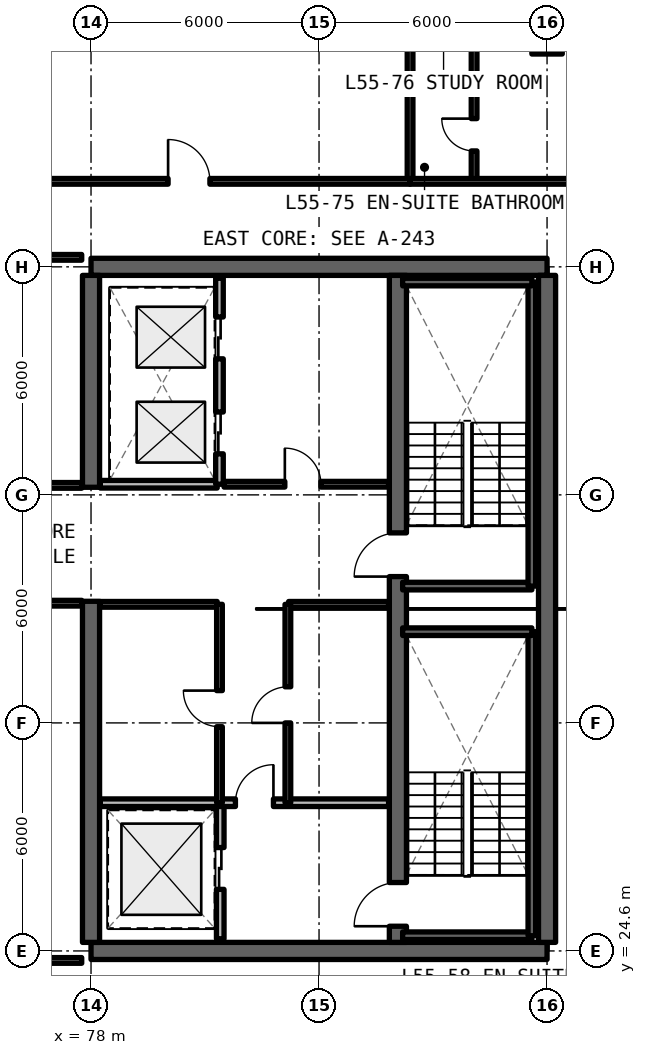
"""IFC4 building model, lengths in metres.
Left out: names, types, materials, properties, quantities, classifications, styles, units other than length and angle.
Written with IfcOpenShell. Run it as: python <this file> out.ifc"""

import sys

from ifc_helpers import new_model, si_unit, direction, frame, frame_2d, origin, origin_2d, place, context, subcontext, project, spatial, rectangle, extrude, element, fill, save


model = new_model("IFC4")
c1 = context("Model", 3, precision=1e-05, world=origin(), true_north=direction((0.0, 1.0)))
c2 = subcontext(c1, "Body", "Model", "MODEL_VIEW")
j1 = project(units=[si_unit("LENGTHUNIT", "METRE"), si_unit("PLANEANGLEUNIT", "RADIAN")], contexts=[c1])
p1 = place(None, origin())
s1 = spatial("IfcSite", under=j1, at=p1, CompositionType="ELEMENT")
p2 = place(p1, origin())
s2 = spatial("IfcBuilding", under=s1, at=p2, CompositionType="ELEMENT")
p3 = place(p2, frame((0.0, 0.0, 198.33)))
s3 = spatial("IfcBuildingStorey", under=s2, at=p3, CompositionType="ELEMENT", Elevation=198.33)
for number, where, z_axis, x_axis in (
    (1, (78.0, 24.6, 0.0), (0.0, 0.0, 1.0), (1.0, 0.0, 0.0)),
    (2, (90.0, 42.6, 0.0), (0.0, 0.0, 1.0), (-1.0, 0.0, 0.0)),
):
    element("IfcWall", number, at=place(p3, frame(where, z_axis=z_axis, x_axis=x_axis)), inside=s3, PredefinedType="SHEAR", context=c2, shape_type="SweptSolid", body=[
        extrude(rectangle(XDim=12.0, YDim=0.45, at=frame_2d((6.0, 0.0))), origin(), (0.0, 0.0, 1.0), 3.3),
    ])
p4 = place(p3, frame((90.0, 24.825, 0.0), z_axis=(0.0, 0.0, 1.0), x_axis=(0.0, 1.0, 0.0)))
e3 = element("IfcWall", 3, at=p4, inside=s3, PredefinedType="SHEAR", context=c2, shape_type="SweptSolid", body=[
    extrude(rectangle(XDim=17.55, YDim=0.45, at=frame_2d((8.775, 0.0))), origin(), (0.0, 0.0, 1.0), 3.3),
])
p5 = place(p3, frame((78.0, 24.825, 0.0), z_axis=(0.0, 0.0, 1.0), x_axis=(0.0, 1.0, 0.0)))
e4 = element("IfcWall", 4, at=p5, inside=s3, PredefinedType="SHEAR", context=c2, shape_type="SweptSolid", body=[
    extrude(rectangle(XDim=8.975, YDim=0.45, at=frame_2d((4.488, 0.0))), origin(), (0.0, 0.0, 1.0), 3.3),
])
p6 = place(p3, frame((78.0, 36.8, 0.0), z_axis=(0.0, 0.0, 1.0), x_axis=(0.0, 1.0, 0.0)))
e5 = element("IfcWall", 5, at=p6, inside=s3, PredefinedType="SHEAR", context=c2, shape_type="SweptSolid", body=[
    extrude(rectangle(XDim=5.575, YDim=0.45, at=frame_2d((2.788, 0.0))), origin(), (0.0, 0.0, 1.0), 3.3),
])
p7 = place(p3, frame((86.075, 24.825, 0.0), z_axis=(0.0, 0.0, 1.0), x_axis=(0.0, 1.0, 0.0)))
e6 = element("IfcWall", 6, at=p7, inside=s3, PredefinedType="SHEAR", context=c2, shape_type="SweptSolid", body=[
    extrude(rectangle(XDim=17.55, YDim=0.45, at=frame_2d((8.775, 0.0))), origin(), (0.0, 0.0, 1.0), 3.3),
])
p8 = place(p7, frame((0.425, 0.0, 0.0)))
e7 = element("IfcOpeningElement", 7, at=p8, cuts=e6, PredefinedType="OPENING", context=c2, shape_type="SweptSolid", body=[
    extrude(rectangle(XDim=1.15, YDim=2.15, at=frame_2d((0.575, 1.075))), frame((0.0, 0.235, 0.0), z_axis=(0.0, -1.0, 0.0), x_axis=(1.0, 0.0, 0.0)), (0.0, 0.0, 1.0), 0.47),
])
p9 = place(p7, frame((9.625, 0.0, 0.0)))
e8 = element("IfcOpeningElement", 8, at=p9, cuts=e6, PredefinedType="OPENING", context=c2, shape_type="SweptSolid", body=[
    extrude(rectangle(XDim=1.15, YDim=2.15, at=frame_2d((0.575, 1.075))), frame((0.0, 0.235, 0.0), z_axis=(0.0, -1.0, 0.0), x_axis=(1.0, 0.0, 0.0)), (0.0, 0.0, 1.0), 0.47),
])
p10 = place(p3, frame((90.0, 48.6, 0.0), z_axis=(0.0, 0.0, 1.0), x_axis=(1.0, 0.0, 0.0)))
e9 = element("IfcColumn", 9, at=p10, inside=s3, PredefinedType="COLUMN", context=c2, shape_type="SweptSolid", body=[
    extrude(rectangle(XDim=0.8, YDim=0.8, at=origin_2d()), origin(), (0.0, 0.0, 1.0), 3.3),
])
p11 = place(p3, frame((81.4, 24.92, 0.0), z_axis=(0.0, 0.0, 1.0), x_axis=(0.0, 1.0, 0.0)))
e10 = element("IfcWall", 10, at=p11, inside=s3, PredefinedType="SOLIDWALL", context=c2, shape_type="SweptSolid", body=[
    extrude(rectangle(XDim=3.58, YDim=0.2, at=frame_2d((1.79, 0.0))), origin(), (0.0, 0.0, 1.0), 2.35),
])
p12 = place(p11, frame((1.3, 0.0, 0.0)))
e11 = element("IfcOpeningElement", 11, at=p12, cuts=e10, PredefinedType="OPENING", context=c2, shape_type="SweptSolid", body=[
    extrude(rectangle(XDim=1.1, YDim=2.2, at=frame_2d((0.55, 1.1))), frame((0.0, 0.11, 0.0), z_axis=(0.0, -1.0, 0.0), x_axis=(1.0, 0.0, 0.0)), (0.0, 0.0, 1.0), 0.22),
])
p13 = place(p3, frame((78.245, 28.5, 0.0), z_axis=(0.0, 0.0, 1.0), x_axis=(1.0, 0.0, 0.0)))
e12 = element("IfcWall", 12, at=p13, inside=s3, PredefinedType="SOLIDWALL", context=c2, shape_type="SweptSolid", body=[
    extrude(rectangle(XDim=7.585, YDim=0.2, at=frame_2d((3.792, 0.0))), origin(), (0.0, 0.0, 1.0), 2.35),
])
p14 = place(p13, frame((3.555, 0.0, 0.0)))
e13 = element("IfcOpeningElement", 13, at=p14, cuts=e12, PredefinedType="OPENING", context=c2, shape_type="SweptSolid", body=[
    extrude(rectangle(XDim=1.0, YDim=2.15, at=frame_2d((0.5, 1.075))), frame((0.0, 0.11, 0.0), z_axis=(0.0, -1.0, 0.0), x_axis=(1.0, 0.0, 0.0)), (0.0, 0.0, 1.0), 0.22),
])
p15 = place(p3, frame((83.2, 33.72, 0.0), z_axis=(0.0, 0.0, 1.0), x_axis=(1.0, 0.0, 0.0)))
e14 = element("IfcWall", 14, at=p15, inside=s3, PredefinedType="SOLIDWALL", context=c2, shape_type="SweptSolid", body=[
    extrude(rectangle(XDim=2.63, YDim=0.15, at=frame_2d((1.315, 0.0))), origin(), (0.0, 0.0, 1.0), 2.35),
])
p16 = place(p3, frame((83.18, 28.5, 0.0), z_axis=(0.0, 0.0, 1.0), x_axis=(0.0, 1.0, 0.0)))
e15 = element("IfcWall", 15, at=p16, inside=s3, PredefinedType="SOLIDWALL", context=c2, shape_type="SweptSolid", body=[
    extrude(rectangle(XDim=5.22, YDim=0.15, at=frame_2d((2.61, 0.0))), origin(), (0.0, 0.0, 1.0), 2.35),
])
p17 = place(p16, frame((2.1, 0.0, 0.0)))
e16 = element("IfcOpeningElement", 16, at=p17, cuts=e15, PredefinedType="OPENING", context=c2, shape_type="SweptSolid", body=[
    extrude(rectangle(XDim=0.95, YDim=2.15, at=frame_2d((0.475, 1.075))), frame((0.0, 0.085, 0.0), z_axis=(0.0, -1.0, 0.0), x_axis=(1.0, 0.0, 0.0)), (0.0, 0.0, 1.0), 0.17),
])
p18 = place(p3, frame((78.245, 33.72, 0.0), z_axis=(0.0, 0.0, 1.0), x_axis=(1.0, 0.0, 0.0)))
e17 = element("IfcWall", 17, at=p18, inside=s3, PredefinedType="SOLIDWALL", context=c2, shape_type="SweptSolid", body=[
    extrude(rectangle(XDim=3.075, YDim=0.15, at=frame_2d((1.538, 0.0))), origin(), (0.0, 0.0, 1.0), 2.35),
])
p19 = place(p3, frame((81.38, 28.5, 0.0), z_axis=(0.0, 0.0, 1.0), x_axis=(0.0, 1.0, 0.0)))
e18 = element("IfcWall", 18, at=p19, inside=s3, PredefinedType="SOLIDWALL", context=c2, shape_type="SweptSolid", body=[
    extrude(rectangle(XDim=5.22, YDim=0.15, at=frame_2d((2.61, 0.0))), origin(), (0.0, 0.0, 1.0), 2.35),
])
p20 = place(p19, frame((2.0, 0.0, 0.0)))
e19 = element("IfcOpeningElement", 19, at=p20, cuts=e18, PredefinedType="OPENING", context=c2, shape_type="SweptSolid", body=[
    extrude(rectangle(XDim=0.95, YDim=2.15, at=frame_2d((0.475, 1.075))), frame((0.0, 0.085, 0.0), z_axis=(0.0, -1.0, 0.0), x_axis=(1.0, 0.0, 0.0)), (0.0, 0.0, 1.0), 0.17),
])
p21 = place(p3, frame((81.5, 36.88, 0.0), z_axis=(0.0, 0.0, 1.0), x_axis=(1.0, 0.0, 0.0)))
e20 = element("IfcWall", 20, at=p21, inside=s3, PredefinedType="SOLIDWALL", context=c2, shape_type="SweptSolid", body=[
    extrude(rectangle(XDim=4.33, YDim=0.15, at=frame_2d((2.165, 0.0))), origin(), (0.0, 0.0, 1.0), 2.35),
])
p22 = place(p21, frame((1.6, 0.0, 0.0)))
e21 = element("IfcOpeningElement", 21, at=p22, cuts=e20, PredefinedType="OPENING", context=c2, shape_type="SweptSolid", body=[
    extrude(rectangle(XDim=0.95, YDim=2.15, at=frame_2d((0.475, 1.075))), frame((0.0, 0.085, 0.0), z_axis=(0.0, -1.0, 0.0), x_axis=(1.0, 0.0, 0.0)), (0.0, 0.0, 1.0), 0.17),
])
p23 = place(p3, frame((78.245, 36.88, 0.0), z_axis=(0.0, 0.0, 1.0), x_axis=(1.0, 0.0, 0.0)))
e22 = element("IfcWall", 22, at=p23, inside=s3, PredefinedType="SOLIDWALL", context=c2, shape_type="SweptSolid", body=[
    extrude(rectangle(XDim=3.075, YDim=0.2, at=frame_2d((1.538, 0.0))), origin(), (0.0, 0.0, 1.0), 2.35),
])
p24 = place(p3, frame((81.38, 36.88, 0.0), z_axis=(0.0, 0.0, 1.0), x_axis=(0.0, 1.0, 0.0)))
e23 = element("IfcWall", 23, at=p24, inside=s3, PredefinedType="SOLIDWALL", context=c2, shape_type="SweptSolid", body=[
    extrude(rectangle(XDim=5.42, YDim=0.2, at=frame_2d((2.71, 0.0))), origin(), (0.0, 0.0, 1.0), 2.35),
])
p25 = place(p24, frame((0.8, 0.0, 0.0)))
e24 = element("IfcOpeningElement", 24, at=p25, cuts=e23, PredefinedType="OPENING", context=c2, shape_type="SweptSolid", body=[
    extrude(rectangle(XDim=1.1, YDim=2.2, at=frame_2d((0.55, 1.1))), frame((0.0, 0.11, 0.0), z_axis=(0.0, -1.0, 0.0), x_axis=(1.0, 0.0, 0.0)), (0.0, 0.0, 1.0), 0.22),
])
p26 = place(p24, frame((3.3, 0.0, 0.0)))
e25 = element("IfcOpeningElement", 25, at=p26, cuts=e23, PredefinedType="OPENING", context=c2, shape_type="SweptSolid", body=[
    extrude(rectangle(XDim=1.1, YDim=2.2, at=frame_2d((0.55, 1.1))), frame((0.0, 0.11, 0.0), z_axis=(0.0, -1.0, 0.0), x_axis=(1.0, 0.0, 0.0)), (0.0, 0.0, 1.0), 0.22),
])
p27 = place(p3, frame((69.85, 24.35, 0.0), z_axis=(0.0, 0.0, 1.0), x_axis=(1.0, 0.0, 0.0)))
e26 = element("IfcWall", 26, at=p27, inside=s3, PredefinedType="SOLIDWALL", context=c2, shape_type="SweptSolid", body=[
    extrude(rectangle(XDim=7.905, YDim=0.15, at=frame_2d((3.952, 0.0))), origin(), (0.0, 0.0, 1.0), 2.35),
])
p28 = place(p3, frame((69.85, 33.75, 0.0), z_axis=(0.0, 0.0, 1.0), x_axis=(1.0, 0.0, 0.0)))
e27 = element("IfcWall", 27, at=p28, inside=s3, PredefinedType="SOLIDWALL", context=c2, shape_type="SweptSolid", body=[
    extrude(rectangle(XDim=7.905, YDim=0.15, at=frame_2d((3.952, 0.0))), origin(), (0.0, 0.0, 1.0), 2.35),
])
p29 = place(p28, frame((3.478, 0.0, 0.0)))
e28 = element("IfcOpeningElement", 28, at=p29, cuts=e27, PredefinedType="OPENING", context=c2, shape_type="SweptSolid", body=[
    extrude(rectangle(XDim=0.95, YDim=2.15, at=frame_2d((0.475, 1.075))), frame((0.0, 0.085, 0.0), z_axis=(0.0, -1.0, 0.0), x_axis=(1.0, 0.0, 0.0)), (0.0, 0.0, 1.0), 0.17),
])
p30 = place(p3, frame((69.85, 36.85, 0.0), z_axis=(0.0, 0.0, 1.0), x_axis=(1.0, 0.0, 0.0)))
e29 = element("IfcWall", 29, at=p30, inside=s3, PredefinedType="SOLIDWALL", context=c2, shape_type="SweptSolid", body=[
    extrude(rectangle(XDim=7.905, YDim=0.15, at=frame_2d((3.952, 0.0))), origin(), (0.0, 0.0, 1.0), 2.35),
])
p31 = place(p30, frame((3.478, 0.0, 0.0)))
e30 = element("IfcOpeningElement", 30, at=p31, cuts=e29, PredefinedType="OPENING", context=c2, shape_type="SweptSolid", body=[
    extrude(rectangle(XDim=0.95, YDim=2.15, at=frame_2d((0.475, 1.075))), frame((0.0, 0.085, 0.0), z_axis=(0.0, -1.0, 0.0), x_axis=(1.0, 0.0, 0.0)), (0.0, 0.0, 1.0), 0.17),
])
p32 = place(p3, frame((69.85, 42.85, 0.0), z_axis=(0.0, 0.0, 1.0), x_axis=(1.0, 0.0, 0.0)))
e31 = element("IfcWall", 31, at=p32, inside=s3, PredefinedType="SOLIDWALL", context=c2, shape_type="SweptSolid", body=[
    extrude(rectangle(XDim=7.905, YDim=0.15, at=frame_2d((3.952, 0.0))), origin(), (0.0, 0.0, 1.0), 2.35),
])
p33 = place(p3, frame((86.395, 44.85, 0.0), z_axis=(0.0, 0.0, 1.0), x_axis=(0.0, 1.0, 0.0)))
e32 = element("IfcWall", 32, at=p33, inside=s3, PredefinedType="SOLIDWALL", context=c2, shape_type="SweptSolid", body=[
    extrude(rectangle(XDim=10.08, YDim=0.15, at=frame_2d((5.04, 0.0))), origin(), (0.0, 0.0, 1.0), 2.35),
])
p34 = place(p3, frame((74.76, 44.85, 0.0), z_axis=(0.0, 0.0, 1.0), x_axis=(1.0, 0.0, 0.0)))
e33 = element("IfcWall", 33, at=p34, inside=s3, PredefinedType="SOLIDWALL", context=c2, shape_type="SweptSolid", body=[
    extrude(rectangle(XDim=11.635, YDim=0.15, at=frame_2d((5.817, 0.0))), origin(), (0.0, 0.0, 1.0), 2.35),
])
p35 = place(p34, frame((5.267, 0.0, 0.0)))
e34 = element("IfcOpeningElement", 34, at=p35, cuts=e33, PredefinedType="OPENING", context=c2, shape_type="SweptSolid", body=[
    extrude(rectangle(XDim=1.1, YDim=2.15, at=frame_2d((0.55, 1.075))), frame((0.0, 0.085, 0.0), z_axis=(0.0, -1.0, 0.0), x_axis=(1.0, 0.0, 0.0)), (0.0, 0.0, 1.0), 0.17),
])
p36 = place(p3, frame((86.395, 47.3, 0.0), z_axis=(0.0, 0.0, 1.0), x_axis=(1.0, 0.0, 0.0)))
e35 = element("IfcWall", 35, at=p36, inside=s3, PredefinedType="PARTITIONING", context=c2, shape_type="SweptSolid", body=[
    extrude(rectangle(XDim=1.685, YDim=0.15, at=frame_2d((0.842, 0.0))), origin(), (0.0, 0.0, 1.0), 2.35),
])
p37 = place(p3, frame((88.08, 44.85, 0.0), z_axis=(0.0, 0.0, 1.0), x_axis=(0.0, 1.0, 0.0)))
e36 = element("IfcWall", 36, at=p37, inside=s3, PredefinedType="PARTITIONING", context=c2, shape_type="SweptSolid", body=[
    extrude(rectangle(XDim=10.08, YDim=0.15, at=frame_2d((5.04, 0.0))), origin(), (0.0, 0.0, 1.0), 2.35),
])
p38 = place(p37, frame((0.8, 0.0, 0.0)))
e37 = element("IfcOpeningElement", 37, at=p38, cuts=e36, PredefinedType="OPENING", context=c2, shape_type="SweptSolid", body=[
    extrude(rectangle(XDim=0.85, YDim=2.1, at=frame_2d((0.425, 1.05))), frame((0.0, 0.085, 0.0), z_axis=(0.0, -1.0, 0.0), x_axis=(1.0, 0.0, 0.0)), (0.0, 0.0, 1.0), 0.17),
])
p39 = place(p37, frame((5.162, 0.0, 0.0)))
e38 = element("IfcOpeningElement", 38, at=p39, cuts=e36, PredefinedType="OPENING", context=c2, shape_type="SweptSolid", body=[
    extrude(rectangle(XDim=0.85, YDim=2.1, at=frame_2d((0.425, 1.05))), frame((0.0, 0.085, 0.0), z_axis=(0.0, -1.0, 0.0), x_axis=(1.0, 0.0, 0.0)), (0.0, 0.0, 1.0), 0.17),
])
p40 = place(p3, frame((86.395, 44.85, 0.0), z_axis=(0.0, 0.0, 1.0), x_axis=(1.0, 0.0, 0.0)))
e39 = element("IfcWall", 39, at=p40, inside=s3, PredefinedType="SOLIDWALL", context=c2, shape_type="SweptSolid", body=[
    extrude(rectangle(XDim=8.805, YDim=0.15, at=frame_2d((4.402, 0.0))), origin(), (0.0, 0.0, 1.0), 2.35),
])
p41 = place(p40, frame((4.81, 0.0, 0.0)))
e40 = element("IfcOpeningElement", 40, at=p41, cuts=e39, PredefinedType="OPENING", context=c2, shape_type="SweptSolid", body=[
    extrude(rectangle(XDim=0.95, YDim=2.15, at=frame_2d((0.475, 1.075))), frame((0.0, 0.085, 0.0), z_axis=(0.0, -1.0, 0.0), x_axis=(1.0, 0.0, 0.0)), (0.0, 0.0, 1.0), 0.17),
])
p42 = place(p3, frame((86.2, 25.0, 0.0), z_axis=(0.0, 0.0, 1.0), x_axis=(1.0, 0.0, 0.0)))
e41 = element("IfcWall", 41, at=p42, inside=s3, PredefinedType="SOLIDWALL", context=c2, shape_type="SweptSolid", body=[
    extrude(rectangle(XDim=3.4, YDim=0.2, at=frame_2d((1.7, 0.0))), origin(), (0.0, 0.0, 1.0), 3.3),
])
p43 = place(p3, frame((89.6, 25.0, 0.0), z_axis=(0.0, 0.0, 1.0), x_axis=(0.0, 1.0, 0.0)))
e42 = element("IfcWall", 42, at=p43, inside=s3, PredefinedType="SOLIDWALL", context=c2, shape_type="SweptSolid", body=[
    extrude(rectangle(XDim=8.0, YDim=0.2, at=frame_2d((4.0, 0.0))), origin(), (0.0, 0.0, 1.0), 3.3),
])
for number, where, z_axis, x_axis in (
    (43, (89.6, 33.0, 0.0), (0.0, 0.0, 1.0), (-1.0, 0.0, 0.0)),
    (44, (86.2, 34.2, 0.0), (0.0, 0.0, 1.0), (1.0, 0.0, 0.0)),
):
    element("IfcWall", number, at=place(p3, frame(where, z_axis=z_axis, x_axis=x_axis)), inside=s3, PredefinedType="SOLIDWALL", context=c2, shape_type="SweptSolid", body=[
        extrude(rectangle(XDim=3.4, YDim=0.2, at=frame_2d((1.7, 0.0))), origin(), (0.0, 0.0, 1.0), 3.3),
    ])
p44 = place(p3, frame((89.6, 34.2, 0.0), z_axis=(0.0, 0.0, 1.0), x_axis=(0.0, 1.0, 0.0)))
e45 = element("IfcWall", 45, at=p44, inside=s3, PredefinedType="SOLIDWALL", context=c2, shape_type="SweptSolid", body=[
    extrude(rectangle(XDim=8.0, YDim=0.2, at=frame_2d((4.0, 0.0))), origin(), (0.0, 0.0, 1.0), 3.3),
])
p45 = place(p3, frame((89.6, 42.2, 0.0), z_axis=(0.0, 0.0, 1.0), x_axis=(-1.0, 0.0, 0.0)))
e46 = element("IfcWall", 46, at=p45, inside=s3, PredefinedType="SOLIDWALL", context=c2, shape_type="SweptSolid", body=[
    extrude(rectangle(XDim=3.4, YDim=0.2, at=frame_2d((1.7, 0.0))), origin(), (0.0, 0.0, 1.0), 3.3),
])
p46 = place(p12, origin())
e47 = element("IfcDoor", 47, at=p46, inside=s3, OperationType="SLIDING_TO_LEFT", PredefinedType="DOOR", context=c2, shape_type="SweptSolid", body=[
    extrude(rectangle(XDim=1.1, YDim=2.2, at=frame_2d((0.55, 1.1))), frame((0.0, 0.025, 0.0), z_axis=(0.0, -1.0, 0.0), x_axis=(1.0, 0.0, 0.0)), (0.0, 0.0, 1.0), 0.05),
])
fill(e11, e47)
p47 = place(p14, origin())
e48 = element("IfcDoor", 48, at=p47, inside=s3, OperationType="SINGLE_SWING_RIGHT", PredefinedType="DOOR", context=c2, shape_type="SweptSolid", body=[
    extrude(rectangle(XDim=1.0, YDim=2.15, at=frame_2d((0.5, 1.075))), frame((0.0, 0.025, 0.0), z_axis=(0.0, -1.0, 0.0), x_axis=(1.0, 0.0, 0.0)), (0.0, 0.0, 1.0), 0.05),
])
fill(e13, e48)
p48 = place(p17, origin())
e49 = element("IfcDoor", 49, at=p48, inside=s3, OperationType="SINGLE_SWING_LEFT", PredefinedType="DOOR", context=c2, shape_type="SweptSolid", body=[
    extrude(rectangle(XDim=0.95, YDim=2.15, at=frame_2d((0.475, 1.075))), frame((0.0, 0.025, 0.0), z_axis=(0.0, -1.0, 0.0), x_axis=(1.0, 0.0, 0.0)), (0.0, 0.0, 1.0), 0.05),
])
fill(e16, e49)
p49 = place(p20, origin())
e50 = element("IfcDoor", 50, at=p49, inside=s3, OperationType="SINGLE_SWING_RIGHT", PredefinedType="DOOR", context=c2, shape_type="SweptSolid", body=[
    extrude(rectangle(XDim=0.95, YDim=2.15, at=frame_2d((0.475, 1.075))), frame((0.0, 0.025, 0.0), z_axis=(0.0, -1.0, 0.0), x_axis=(1.0, 0.0, 0.0)), (0.0, 0.0, 1.0), 0.05),
])
fill(e19, e50)
p50 = place(p22, origin())
e51 = element("IfcDoor", 51, at=p50, inside=s3, OperationType="SINGLE_SWING_LEFT", PredefinedType="DOOR", context=c2, shape_type="SweptSolid", body=[
    extrude(rectangle(XDim=0.95, YDim=2.15, at=frame_2d((0.475, 1.075))), frame((0.0, 0.025, 0.0), z_axis=(0.0, -1.0, 0.0), x_axis=(1.0, 0.0, 0.0)), (0.0, 0.0, 1.0), 0.05),
])
fill(e21, e51)
p51 = place(p25, origin())
e52 = element("IfcDoor", 52, at=p51, inside=s3, OperationType="SLIDING_TO_LEFT", PredefinedType="DOOR", context=c2, shape_type="SweptSolid", body=[
    extrude(rectangle(XDim=1.1, YDim=2.2, at=frame_2d((0.55, 1.1))), frame((0.0, 0.025, 0.0), z_axis=(0.0, -1.0, 0.0), x_axis=(1.0, 0.0, 0.0)), (0.0, 0.0, 1.0), 0.05),
])
fill(e24, e52)
p52 = place(p26, origin())
e53 = element("IfcDoor", 53, at=p52, inside=s3, OperationType="SLIDING_TO_RIGHT", PredefinedType="DOOR", context=c2, shape_type="SweptSolid", body=[
    extrude(rectangle(XDim=1.1, YDim=2.2, at=frame_2d((0.55, 1.1))), frame((0.0, 0.025, 0.0), z_axis=(0.0, -1.0, 0.0), x_axis=(1.0, 0.0, 0.0)), (0.0, 0.0, 1.0), 0.05),
])
fill(e25, e53)
p53 = place(p35, origin())
e54 = element("IfcDoor", 54, at=p53, inside=s3, OperationType="SINGLE_SWING_LEFT", PredefinedType="DOOR", context=c2, shape_type="SweptSolid", body=[
    extrude(rectangle(XDim=1.1, YDim=2.15, at=frame_2d((0.55, 1.075))), frame((0.0, 0.025, 0.0), z_axis=(0.0, -1.0, 0.0), x_axis=(1.0, 0.0, 0.0)), (0.0, 0.0, 1.0), 0.05),
])
fill(e34, e54)
p54 = place(p38, origin())
e55 = element("IfcDoor", 55, at=p54, inside=s3, OperationType="SINGLE_SWING_RIGHT", PredefinedType="DOOR", context=c2, shape_type="SweptSolid", body=[
    extrude(rectangle(XDim=0.85, YDim=2.1, at=frame_2d((0.425, 1.05))), frame((0.0, 0.025, 0.0), z_axis=(0.0, -1.0, 0.0), x_axis=(1.0, 0.0, 0.0)), (0.0, 0.0, 1.0), 0.05),
])
fill(e37, e55)
p55 = place(p8, origin())
e56 = element("IfcDoor", 56, at=p55, inside=s3, OperationType="SINGLE_SWING_LEFT", PredefinedType="DOOR", context=c2, shape_type="SweptSolid", body=[
    extrude(rectangle(XDim=1.15, YDim=2.15, at=frame_2d((0.575, 1.075))), frame((0.0, 0.025, 0.0), z_axis=(0.0, -1.0, 0.0), x_axis=(1.0, 0.0, 0.0)), (0.0, 0.0, 1.0), 0.05),
])
fill(e7, e56)
p56 = place(p9, origin())
e57 = element("IfcDoor", 57, at=p56, inside=s3, OperationType="SINGLE_SWING_RIGHT", PredefinedType="DOOR", context=c2, shape_type="SweptSolid", body=[
    extrude(rectangle(XDim=1.15, YDim=2.15, at=frame_2d((0.575, 1.075))), frame((0.0, 0.025, 0.0), z_axis=(0.0, -1.0, 0.0), x_axis=(1.0, 0.0, 0.0)), (0.0, 0.0, 1.0), 0.05),
])
fill(e8, e57)
save(model, sys.argv[1])
